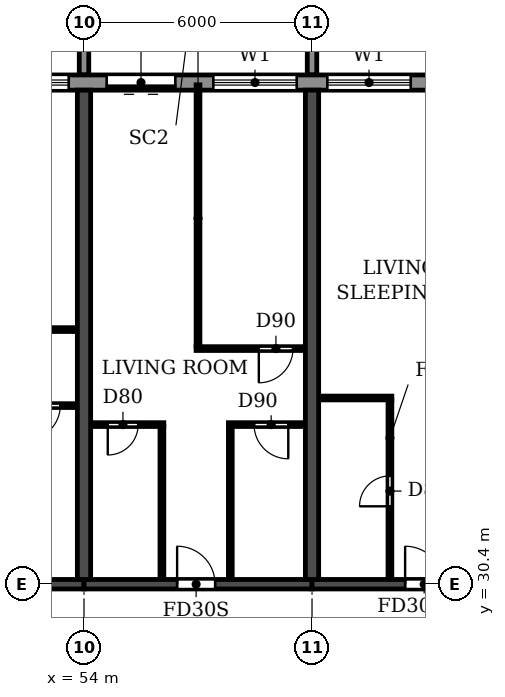
"""IFC4 building model, lengths in metres.
Left out: names, types, materials, properties, quantities, classifications, styles, units other than length and angle.
Written with IfcOpenShell. Run it as: python <this file> out.ifc"""

import sys

from ifc_helpers import new_model, si_unit, direction, frame, frame_2d, origin, place, context, subcontext, project, spatial, polyline, rectangle, outline, extrude, source, transform, mapped, element, fill, save


model = new_model("IFC4")
c1 = context("Model", 3, precision=1e-05, world=origin(), true_north=direction((0.0, 1.0)))
c2 = subcontext(c1, "Body", "Model", "MODEL_VIEW")
j1 = project(units=[si_unit("LENGTHUNIT", "METRE"), si_unit("PLANEANGLEUNIT", "RADIAN")], contexts=[c1])
p1 = place(None, origin())
s1 = spatial("IfcSite", under=j1, at=p1, CompositionType="ELEMENT")
p2 = place(p1, origin())
s2 = spatial("IfcBuilding", under=s1, at=p2, CompositionType="ELEMENT")
p3 = place(p2, frame((0.0, 0.0, 109.2)))
s3 = spatial("IfcBuildingStorey", under=s2, at=p3, CompositionType="ELEMENT", Elevation=109.2)
for number, where, z_axis, x_axis in (
    (1, (54.0, 30.525, 0.0), (0.0, 0.0, 1.0), (0.0, 1.0, 0.0)),
    (2, (60.0, 30.525, 0.0), (0.0, 0.0, 1.0), (0.0, 1.0, 0.0)),
):
    element("IfcWall", number, at=place(p3, frame(where, z_axis=z_axis, x_axis=x_axis)), inside=s3, PredefinedType="SHEAR", context=c2, shape_type="SweptSolid", body=[
        extrude(rectangle(XDim=12.875, YDim=0.35, at=frame_2d((6.438, 0.0))), origin(), (0.0, 0.0, 1.0), 3.06),
    ])
p4 = place(p3, frame((48.0, 30.4, 0.0), z_axis=(0.0, 0.0, 1.0), x_axis=(1.0, 0.0, 0.0)))
e3 = element("IfcWall", 3, at=p4, inside=s3, PredefinedType="SHEAR", context=c2, shape_type="SweptSolid", body=[
    extrude(rectangle(XDim=6.0, YDim=0.25, at=frame_2d((3.0, 0.0))), origin(), (0.0, 0.0, 1.0), 2.46),
])
p5 = place(p4, frame((2.45, 0.0, 0.0)))
e4 = element("IfcOpeningElement", 4, at=p5, cuts=e3, PredefinedType="OPENING", context=c2, shape_type="SweptSolid", body=[
    extrude(rectangle(XDim=1.0, YDim=2.1, at=frame_2d((0.5, 1.05))), frame((0.0, 0.135, 0.0), z_axis=(0.0, -1.0, 0.0), x_axis=(1.0, 0.0, 0.0)), (0.0, 0.0, 1.0), 0.27),
])
p6 = place(p3, frame((54.0, 30.4, 0.0), z_axis=(0.0, 0.0, 1.0), x_axis=(1.0, 0.0, 0.0)))
e5 = element("IfcWall", 5, at=p6, inside=s3, PredefinedType="SHEAR", context=c2, shape_type="SweptSolid", body=[
    extrude(rectangle(XDim=6.0, YDim=0.25, at=frame_2d((3.0, 0.0))), origin(), (0.0, 0.0, 1.0), 2.46),
])
p7 = place(p6, frame((2.45, 0.0, 0.0)))
e6 = element("IfcOpeningElement", 6, at=p7, cuts=e5, PredefinedType="OPENING", context=c2, shape_type="SweptSolid", body=[
    extrude(rectangle(XDim=1.0, YDim=2.1, at=frame_2d((0.5, 1.05))), frame((0.0, 0.135, 0.0), z_axis=(0.0, -1.0, 0.0), x_axis=(1.0, 0.0, 0.0)), (0.0, 0.0, 1.0), 0.27),
])
p8 = place(p3, frame((60.0, 30.4, 0.0), z_axis=(0.0, 0.0, 1.0), x_axis=(1.0, 0.0, 0.0)))
e7 = element("IfcWall", 7, at=p8, inside=s3, PredefinedType="SHEAR", context=c2, shape_type="SweptSolid", body=[
    extrude(rectangle(XDim=6.0, YDim=0.25, at=frame_2d((3.0, 0.0))), origin(), (0.0, 0.0, 1.0), 2.46),
])
p9 = place(p8, frame((2.45, 0.0, 0.0)))
e8 = element("IfcOpeningElement", 8, at=p9, cuts=e7, PredefinedType="OPENING", context=c2, shape_type="SweptSolid", body=[
    extrude(rectangle(XDim=1.0, YDim=2.1, at=frame_2d((0.5, 1.05))), frame((0.0, 0.135, 0.0), z_axis=(0.0, -1.0, 0.0), x_axis=(1.0, 0.0, 0.0)), (0.0, 0.0, 1.0), 0.27),
])
p10 = place(p3, frame((85.317, 43.6, 0.0), z_axis=(0.0, 0.0, 1.0), x_axis=(-1.0, 0.0, 0.0)))
e9 = element("IfcWall", 9, at=p10, inside=s3, PredefinedType="STANDARD", context=c2, shape_type="SweptSolid", body=[
    extrude(rectangle(XDim=68.634, YDim=0.4, at=frame_2d((34.317, 0.0))), origin(), (0.0, 0.0, 1.0), 3.06),
])
p11 = place(p10, frame((64.917, 0.0, 0.0)))
e10 = element("IfcOpeningElement", 10, at=p11, cuts=e9, PredefinedType="OPENING", context=c2, shape_type="SweptSolid", body=[
    extrude(rectangle(XDim=1.8, YDim=2.4, at=frame_2d((0.9, 1.2))), frame((0.0, 0.21, 0.0), z_axis=(0.0, -1.0, 0.0), x_axis=(1.0, 0.0, 0.0)), (0.0, 0.0, 1.0), 0.42),
])
p12 = place(p10, frame((61.717, 0.0, 0.9)))
e11 = element("IfcOpeningElement", 11, at=p12, cuts=e9, PredefinedType="OPENING", context=c2, shape_type="SweptSolid", body=[
    extrude(rectangle(XDim=2.2, YDim=1.5, at=frame_2d((1.1, 0.75))), frame((0.0, 0.21, 0.0), z_axis=(0.0, -1.0, 0.0), x_axis=(1.0, 0.0, 0.0)), (0.0, 0.0, 1.0), 0.42),
])
p13 = place(p10, frame((58.717, 0.0, 0.9)))
e12 = element("IfcOpeningElement", 12, at=p13, cuts=e9, PredefinedType="OPENING", context=c2, shape_type="SweptSolid", body=[
    extrude(rectangle(XDim=2.2, YDim=1.5, at=frame_2d((1.1, 0.75))), frame((0.0, 0.21, 0.0), z_axis=(0.0, -1.0, 0.0), x_axis=(1.0, 0.0, 0.0)), (0.0, 0.0, 1.0), 0.42),
])
p14 = place(p10, frame((55.917, 0.0, 0.0)))
e13 = element("IfcOpeningElement", 13, at=p14, cuts=e9, PredefinedType="OPENING", context=c2, shape_type="SweptSolid", body=[
    extrude(rectangle(XDim=1.8, YDim=2.4, at=frame_2d((0.9, 1.2))), frame((0.0, 0.21, 0.0), z_axis=(0.0, -1.0, 0.0), x_axis=(1.0, 0.0, 0.0)), (0.0, 0.0, 1.0), 0.42),
])
p15 = place(p10, frame((52.917, 0.0, 0.0)))
e14 = element("IfcOpeningElement", 14, at=p15, cuts=e9, PredefinedType="OPENING", context=c2, shape_type="SweptSolid", body=[
    extrude(rectangle(XDim=1.8, YDim=2.4, at=frame_2d((0.9, 1.2))), frame((0.0, 0.21, 0.0), z_axis=(0.0, -1.0, 0.0), x_axis=(1.0, 0.0, 0.0)), (0.0, 0.0, 1.0), 0.42),
])
p16 = place(p10, frame((49.717, 0.0, 0.9)))
e15 = element("IfcOpeningElement", 15, at=p16, cuts=e9, PredefinedType="OPENING", context=c2, shape_type="SweptSolid", body=[
    extrude(rectangle(XDim=2.2, YDim=1.5, at=frame_2d((1.1, 0.75))), frame((0.0, 0.21, 0.0), z_axis=(0.0, -1.0, 0.0), x_axis=(1.0, 0.0, 0.0)), (0.0, 0.0, 1.0), 0.42),
])
p17 = place(p10, frame((46.717, 0.0, 0.9)))
e16 = element("IfcOpeningElement", 16, at=p17, cuts=e9, PredefinedType="OPENING", context=c2, shape_type="SweptSolid", body=[
    extrude(rectangle(XDim=2.2, YDim=1.5, at=frame_2d((1.1, 0.75))), frame((0.0, 0.21, 0.0), z_axis=(0.0, -1.0, 0.0), x_axis=(1.0, 0.0, 0.0)), (0.0, 0.0, 1.0), 0.42),
])
p18 = place(p10, frame((43.917, 0.0, 0.0)))
e17 = element("IfcOpeningElement", 17, at=p18, cuts=e9, PredefinedType="OPENING", context=c2, shape_type="SweptSolid", body=[
    extrude(rectangle(XDim=1.8, YDim=2.4, at=frame_2d((0.9, 1.2))), frame((0.0, 0.21, 0.0), z_axis=(0.0, -1.0, 0.0), x_axis=(1.0, 0.0, 0.0)), (0.0, 0.0, 1.0), 0.42),
])
p19 = place(p10, frame((40.717, 0.0, 0.9)))
e18 = element("IfcOpeningElement", 18, at=p19, cuts=e9, PredefinedType="OPENING", context=c2, shape_type="SweptSolid", body=[
    extrude(rectangle(XDim=2.2, YDim=1.5, at=frame_2d((1.1, 0.75))), frame((0.0, 0.21, 0.0), z_axis=(0.0, -1.0, 0.0), x_axis=(1.0, 0.0, 0.0)), (0.0, 0.0, 1.0), 0.42),
])
p20 = place(p10, frame((37.717, 0.0, 0.9)))
e19 = element("IfcOpeningElement", 19, at=p20, cuts=e9, PredefinedType="OPENING", context=c2, shape_type="SweptSolid", body=[
    extrude(rectangle(XDim=2.2, YDim=1.5, at=frame_2d((1.1, 0.75))), frame((0.0, 0.21, 0.0), z_axis=(0.0, -1.0, 0.0), x_axis=(1.0, 0.0, 0.0)), (0.0, 0.0, 1.0), 0.42),
])
p21 = place(p10, frame((34.917, 0.0, 0.0)))
e20 = element("IfcOpeningElement", 20, at=p21, cuts=e9, PredefinedType="OPENING", context=c2, shape_type="SweptSolid", body=[
    extrude(rectangle(XDim=1.8, YDim=2.4, at=frame_2d((0.9, 1.2))), frame((0.0, 0.21, 0.0), z_axis=(0.0, -1.0, 0.0), x_axis=(1.0, 0.0, 0.0)), (0.0, 0.0, 1.0), 0.42),
])
p22 = place(p10, frame((31.717, 0.0, 0.9)))
e21 = element("IfcOpeningElement", 21, at=p22, cuts=e9, PredefinedType="OPENING", context=c2, shape_type="SweptSolid", body=[
    extrude(rectangle(XDim=2.2, YDim=1.5, at=frame_2d((1.1, 0.75))), frame((0.0, 0.21, 0.0), z_axis=(0.0, -1.0, 0.0), x_axis=(1.0, 0.0, 0.0)), (0.0, 0.0, 1.0), 0.42),
])
p23 = place(p10, frame((28.917, 0.0, 0.0)))
e22 = element("IfcOpeningElement", 22, at=p23, cuts=e9, PredefinedType="OPENING", context=c2, shape_type="SweptSolid", body=[
    extrude(rectangle(XDim=1.8, YDim=2.4, at=frame_2d((0.9, 1.2))), frame((0.0, 0.21, 0.0), z_axis=(0.0, -1.0, 0.0), x_axis=(1.0, 0.0, 0.0)), (0.0, 0.0, 1.0), 0.42),
])
p24 = place(p10, frame((25.717, 0.0, 0.9)))
e23 = element("IfcOpeningElement", 23, at=p24, cuts=e9, PredefinedType="OPENING", context=c2, shape_type="SweptSolid", body=[
    extrude(rectangle(XDim=2.2, YDim=1.5, at=frame_2d((1.1, 0.75))), frame((0.0, 0.21, 0.0), z_axis=(0.0, -1.0, 0.0), x_axis=(1.0, 0.0, 0.0)), (0.0, 0.0, 1.0), 0.42),
])
p25 = place(p10, frame((22.717, 0.0, 0.9)))
e24 = element("IfcOpeningElement", 24, at=p25, cuts=e9, PredefinedType="OPENING", context=c2, shape_type="SweptSolid", body=[
    extrude(rectangle(XDim=2.2, YDim=1.5, at=frame_2d((1.1, 0.75))), frame((0.0, 0.21, 0.0), z_axis=(0.0, -1.0, 0.0), x_axis=(1.0, 0.0, 0.0)), (0.0, 0.0, 1.0), 0.42),
])
p26 = place(p10, frame((19.917, 0.0, 0.0)))
e25 = element("IfcOpeningElement", 25, at=p26, cuts=e9, PredefinedType="OPENING", context=c2, shape_type="SweptSolid", body=[
    extrude(rectangle(XDim=1.8, YDim=2.4, at=frame_2d((0.9, 1.2))), frame((0.0, 0.21, 0.0), z_axis=(0.0, -1.0, 0.0), x_axis=(1.0, 0.0, 0.0)), (0.0, 0.0, 1.0), 0.42),
])
p27 = place(p10, frame((16.717, 0.0, 0.9)))
e26 = element("IfcOpeningElement", 26, at=p27, cuts=e9, PredefinedType="OPENING", context=c2, shape_type="SweptSolid", body=[
    extrude(rectangle(XDim=2.2, YDim=1.5, at=frame_2d((1.1, 0.75))), frame((0.0, 0.21, 0.0), z_axis=(0.0, -1.0, 0.0), x_axis=(1.0, 0.0, 0.0)), (0.0, 0.0, 1.0), 0.42),
])
p28 = place(p10, frame((13.917, 0.0, 0.0)))
e27 = element("IfcOpeningElement", 27, at=p28, cuts=e9, PredefinedType="OPENING", context=c2, shape_type="SweptSolid", body=[
    extrude(rectangle(XDim=1.8, YDim=2.4, at=frame_2d((0.9, 1.2))), frame((0.0, 0.21, 0.0), z_axis=(0.0, -1.0, 0.0), x_axis=(1.0, 0.0, 0.0)), (0.0, 0.0, 1.0), 0.42),
])
p29 = place(p10, frame((10.717, 0.0, 0.9)))
e28 = element("IfcOpeningElement", 28, at=p29, cuts=e9, PredefinedType="OPENING", context=c2, shape_type="SweptSolid", body=[
    extrude(rectangle(XDim=2.2, YDim=1.5, at=frame_2d((1.1, 0.75))), frame((0.0, 0.21, 0.0), z_axis=(0.0, -1.0, 0.0), x_axis=(1.0, 0.0, 0.0)), (0.0, 0.0, 1.0), 0.42),
])
p30 = place(p10, frame((7.717, 0.0, 0.9)))
e29 = element("IfcOpeningElement", 29, at=p30, cuts=e9, PredefinedType="OPENING", context=c2, shape_type="SweptSolid", body=[
    extrude(rectangle(XDim=2.2, YDim=1.5, at=frame_2d((1.1, 0.75))), frame((0.0, 0.21, 0.0), z_axis=(0.0, -1.0, 0.0), x_axis=(1.0, 0.0, 0.0)), (0.0, 0.0, 1.0), 0.42),
])
p31 = place(p10, frame((4.917, 0.0, 0.0)))
e30 = element("IfcOpeningElement", 30, at=p31, cuts=e9, PredefinedType="OPENING", context=c2, shape_type="SweptSolid", body=[
    extrude(rectangle(XDim=1.8, YDim=2.4, at=frame_2d((0.9, 1.2))), frame((0.0, 0.21, 0.0), z_axis=(0.0, -1.0, 0.0), x_axis=(1.0, 0.0, 0.0)), (0.0, 0.0, 1.0), 0.42),
])
p32 = place(p10, frame((1.717, 0.0, 0.9)))
e31 = element("IfcOpeningElement", 31, at=p32, cuts=e9, PredefinedType="OPENING", context=c2, shape_type="SweptSolid", body=[
    extrude(rectangle(XDim=2.2, YDim=1.5, at=frame_2d((1.1, 0.75))), frame((0.0, 0.21, 0.0), z_axis=(0.0, -1.0, 0.0), x_axis=(1.0, 0.0, 0.0)), (0.0, 0.0, 1.0), 0.42),
])
m1 = source(origin(), c2, "Body", "SweptSolid", [
    extrude(outline(polyline([(0.0, 0.0), (0.25, 0.0), (0.25, 3.1), (0.0, 3.1), (0.0, 0.0)])), origin(), (0.0, 0.0, 1.0), 3.1),
])
for number, where in (
    (32, (53.875, 43.8, 0.0)),
    (33, (59.875, 43.8, 0.0)),
):
    element("IfcWall", number, at=place(p3, frame(where)), inside=s3, PredefinedType="STANDARD", context=c2, shape_type="MappedRepresentation", body=[
        mapped(m1, transform((0.0, 0.0, 0.0))),
    ])
p33 = place(p3, frame((54.185, 34.6, 0.0), z_axis=(0.0, 0.0, 1.0), x_axis=(1.0, 0.0, 0.0)))
e34 = element("IfcWall", 34, at=p33, inside=s3, PredefinedType="PARTITIONING", context=c2, shape_type="SweptSolid", body=[
    extrude(rectangle(XDim=1.915, YDim=0.1, at=frame_2d((0.958, 0.0))), origin(), (0.0, 0.0, 1.0), 3.06),
])
p34 = place(p33, frame((0.44, 0.0, 0.0)))
e35 = element("IfcOpeningElement", 35, at=p34, cuts=e34, PredefinedType="OPENING", context=c2, shape_type="SweptSolid", body=[
    extrude(rectangle(XDim=0.8, YDim=2.1, at=frame_2d((0.4, 1.05))), frame((0.0, 0.06, 0.0), z_axis=(0.0, -1.0, 0.0), x_axis=(1.0, 0.0, 0.0)), (0.0, 0.0, 1.0), 0.12),
])
p35 = place(p3, frame((57.8, 34.6, 0.0), z_axis=(0.0, 0.0, 1.0), x_axis=(1.0, 0.0, 0.0)))
e36 = element("IfcWall", 36, at=p35, inside=s3, PredefinedType="PARTITIONING", context=c2, shape_type="SweptSolid", body=[
    extrude(rectangle(XDim=2.015, YDim=0.1, at=frame_2d((1.007, 0.0))), origin(), (0.0, 0.0, 1.0), 3.06),
])
p36 = place(p35, frame((0.675, 0.0, 0.0)))
e37 = element("IfcOpeningElement", 37, at=p36, cuts=e36, PredefinedType="OPENING", context=c2, shape_type="SweptSolid", body=[
    extrude(rectangle(XDim=0.9, YDim=2.1, at=frame_2d((0.45, 1.05))), frame((0.0, 0.06, 0.0), z_axis=(0.0, -1.0, 0.0), x_axis=(1.0, 0.0, 0.0)), (0.0, 0.0, 1.0), 0.12),
])
p37 = place(p3, frame((51.8, 35.1, 0.0), z_axis=(0.0, 0.0, 1.0), x_axis=(1.0, 0.0, 0.0)))
e38 = element("IfcWall", 38, at=p37, inside=s3, PredefinedType="PARTITIONING", context=c2, shape_type="SweptSolid", body=[
    extrude(rectangle(XDim=2.015, YDim=0.1, at=frame_2d((1.007, 0.0))), origin(), (0.0, 0.0, 1.0), 3.06),
])
p38 = place(p37, frame((0.675, 0.0, 0.0)))
e39 = element("IfcOpeningElement", 39, at=p38, cuts=e38, PredefinedType="OPENING", context=c2, shape_type="SweptSolid", body=[
    extrude(rectangle(XDim=0.9, YDim=2.1, at=frame_2d((0.45, 1.05))), frame((0.0, 0.06, 0.0), z_axis=(0.0, -1.0, 0.0), x_axis=(1.0, 0.0, 0.0)), (0.0, 0.0, 1.0), 0.12),
])
p39 = place(p3, frame((60.185, 35.3, 0.0), z_axis=(0.0, 0.0, 1.0), x_axis=(1.0, 0.0, 0.0)))
e40 = element("IfcWall", 40, at=p39, inside=s3, PredefinedType="PARTITIONING", context=c2, shape_type="SweptSolid", body=[
    extrude(rectangle(XDim=1.915, YDim=0.1, at=frame_2d((0.958, 0.0))), origin(), (0.0, 0.0, 1.0), 3.06),
])
p40 = place(p3, frame((56.95, 36.6, 0.0), z_axis=(0.0, 0.0, 1.0), x_axis=(1.0, 0.0, 0.0)))
e41 = element("IfcWall", 41, at=p40, inside=s3, PredefinedType="PARTITIONING", context=c2, shape_type="SweptSolid", body=[
    extrude(rectangle(XDim=2.865, YDim=0.1, at=frame_2d((1.433, 0.0))), origin(), (0.0, 0.0, 1.0), 3.06),
])
p41 = place(p40, frame((1.65, 0.0, 0.0)))
e42 = element("IfcOpeningElement", 42, at=p41, cuts=e41, PredefinedType="OPENING", context=c2, shape_type="SweptSolid", body=[
    extrude(rectangle(XDim=0.9, YDim=2.1, at=frame_2d((0.45, 1.05))), frame((0.0, 0.06, 0.0), z_axis=(0.0, -1.0, 0.0), x_axis=(1.0, 0.0, 0.0)), (0.0, 0.0, 1.0), 0.12),
])
p42 = place(p3, frame((50.95, 37.1, 0.0), z_axis=(0.0, 0.0, 1.0), x_axis=(1.0, 0.0, 0.0)))
e43 = element("IfcWall", 43, at=p42, inside=s3, PredefinedType="PARTITIONING", context=c2, shape_type="SweptSolid", body=[
    extrude(rectangle(XDim=2.865, YDim=0.1, at=frame_2d((1.433, 0.0))), origin(), (0.0, 0.0, 1.0), 3.06),
])
p43 = place(p42, frame((0.55, 0.0, 0.0)))
e44 = element("IfcOpeningElement", 44, at=p43, cuts=e43, PredefinedType="OPENING", context=c2, shape_type="SweptSolid", body=[
    extrude(rectangle(XDim=0.9, YDim=2.1, at=frame_2d((0.45, 1.05))), frame((0.0, 0.06, 0.0), z_axis=(0.0, -1.0, 0.0), x_axis=(1.0, 0.0, 0.0)), (0.0, 0.0, 1.0), 0.12),
])
p44 = place(p3, frame((56.05, 30.535, 0.0), z_axis=(0.0, 0.0, 1.0), x_axis=(0.0, 1.0, 0.0)))
e45 = element("IfcWall", 45, at=p44, inside=s3, PredefinedType="PARTITIONING", context=c2, shape_type="SweptSolid", body=[
    extrude(rectangle(XDim=4.015, YDim=0.1, at=frame_2d((2.008, 0.0))), origin(), (0.0, 0.0, 1.0), 3.06),
])
p45 = place(p3, frame((57.0, 36.65, 0.0), z_axis=(0.0, 0.0, 1.0), x_axis=(0.0, 1.0, 0.0)))
e46 = element("IfcWall", 46, at=p45, inside=s3, PredefinedType="PARTITIONING", context=c2, shape_type="SweptSolid", body=[
    extrude(rectangle(XDim=6.89, YDim=0.1, at=frame_2d((3.445, 0.0))), origin(), (0.0, 0.0, 1.0), 3.06),
])
p46 = place(p3, frame((57.85, 30.535, 0.0), z_axis=(0.0, 0.0, 1.0), x_axis=(0.0, 1.0, 0.0)))
e47 = element("IfcWall", 47, at=p46, inside=s3, PredefinedType="PARTITIONING", context=c2, shape_type="SweptSolid", body=[
    extrude(rectangle(XDim=4.015, YDim=0.1, at=frame_2d((2.008, 0.0))), origin(), (0.0, 0.0, 1.0), 3.06),
])
p47 = place(p3, frame((62.05, 30.535, 0.0), z_axis=(0.0, 0.0, 1.0), x_axis=(0.0, 1.0, 0.0)))
e48 = element("IfcWall", 48, at=p47, inside=s3, PredefinedType="PARTITIONING", context=c2, shape_type="SweptSolid", body=[
    extrude(rectangle(XDim=4.715, YDim=0.1, at=frame_2d((2.357, 0.0))), origin(), (0.0, 0.0, 1.0), 3.06),
])
p48 = place(p47, frame((1.915, 0.0, 0.0)))
e49 = element("IfcOpeningElement", 49, at=p48, cuts=e48, PredefinedType="OPENING", context=c2, shape_type="SweptSolid", body=[
    extrude(rectangle(XDim=0.8, YDim=2.1, at=frame_2d((0.4, 1.05))), frame((0.0, 0.06, 0.0), z_axis=(0.0, -1.0, 0.0), x_axis=(1.0, 0.0, 0.0)), (0.0, 0.0, 1.0), 0.12),
])
p49 = place(p22, origin())
e50 = element("IfcWindow", 50, at=p49, inside=s3, PartitioningType="DOUBLE_PANEL_HORIZONTAL", PredefinedType="WINDOW", context=c2, shape_type="SweptSolid", body=[
    extrude(rectangle(XDim=2.2, YDim=1.5, at=frame_2d((1.1, 0.75))), frame((0.0, 0.03, 0.0), z_axis=(0.0, -1.0, 0.0), x_axis=(1.0, 0.0, 0.0)), (0.0, 0.0, 1.0), 0.06),
])
fill(e21, e50)
p50 = place(p23, origin())
e51 = element("IfcDoor", 51, at=p50, inside=s3, OperationType="DOUBLE_DOOR_SLIDING", PredefinedType="DOOR", context=c2, shape_type="SweptSolid", body=[
    extrude(rectangle(XDim=1.8, YDim=2.4, at=frame_2d((0.9, 1.2))), frame((0.0, 0.025, 0.0), z_axis=(0.0, -1.0, 0.0), x_axis=(1.0, 0.0, 0.0)), (0.0, 0.0, 1.0), 0.05),
])
fill(e22, e51)
p51 = place(p24, origin())
e52 = element("IfcWindow", 52, at=p51, inside=s3, PartitioningType="DOUBLE_PANEL_HORIZONTAL", PredefinedType="WINDOW", context=c2, shape_type="SweptSolid", body=[
    extrude(rectangle(XDim=2.2, YDim=1.5, at=frame_2d((1.1, 0.75))), frame((0.0, 0.03, 0.0), z_axis=(0.0, -1.0, 0.0), x_axis=(1.0, 0.0, 0.0)), (0.0, 0.0, 1.0), 0.06),
])
fill(e23, e52)
p52 = place(p25, origin())
e53 = element("IfcWindow", 53, at=p52, inside=s3, PartitioningType="DOUBLE_PANEL_HORIZONTAL", PredefinedType="WINDOW", context=c2, shape_type="SweptSolid", body=[
    extrude(rectangle(XDim=2.2, YDim=1.5, at=frame_2d((1.1, 0.75))), frame((0.0, 0.03, 0.0), z_axis=(0.0, -1.0, 0.0), x_axis=(1.0, 0.0, 0.0)), (0.0, 0.0, 1.0), 0.06),
])
fill(e24, e53)
p53 = place(p38, frame((0.9, 0.0, 0.0), z_axis=(0.0, 0.0, 1.0), x_axis=(-1.0, 0.0, 0.0)))
e54 = element("IfcDoor", 54, at=p53, inside=s3, OperationType="SINGLE_SWING_RIGHT", PredefinedType="DOOR", context=c2, shape_type="SweptSolid", body=[
    extrude(rectangle(XDim=0.9, YDim=2.1, at=frame_2d((0.45, 1.05))), frame((0.0, 0.025, 0.0), z_axis=(0.0, -1.0, 0.0), x_axis=(1.0, 0.0, 0.0)), (0.0, 0.0, 1.0), 0.05),
])
fill(e39, e54)
p54 = place(p34, frame((0.8, 0.0, 0.0), z_axis=(0.0, 0.0, 1.0), x_axis=(-1.0, 0.0, 0.0)))
e55 = element("IfcDoor", 55, at=p54, inside=s3, OperationType="SINGLE_SWING_RIGHT", PredefinedType="DOOR", context=c2, shape_type="SweptSolid", body=[
    extrude(rectangle(XDim=0.8, YDim=2.1, at=frame_2d((0.4, 1.05))), frame((0.0, 0.025, 0.0), z_axis=(0.0, -1.0, 0.0), x_axis=(1.0, 0.0, 0.0)), (0.0, 0.0, 1.0), 0.05),
])
fill(e35, e55)
p55 = place(p7, origin())
e56 = element("IfcDoor", 56, at=p55, inside=s3, OperationType="SINGLE_SWING_LEFT", PredefinedType="DOOR", context=c2, shape_type="SweptSolid", body=[
    extrude(rectangle(XDim=1.0, YDim=2.1, at=frame_2d((0.5, 1.05))), frame((0.0, 0.025, 0.0), z_axis=(0.0, -1.0, 0.0), x_axis=(1.0, 0.0, 0.0)), (0.0, 0.0, 1.0), 0.05),
])
fill(e6, e56)
p56 = place(p36, frame((0.9, 0.0, 0.0), z_axis=(0.0, 0.0, 1.0), x_axis=(-1.0, 0.0, 0.0)))
e57 = element("IfcDoor", 57, at=p56, inside=s3, OperationType="SINGLE_SWING_LEFT", PredefinedType="DOOR", context=c2, shape_type="SweptSolid", body=[
    extrude(rectangle(XDim=0.9, YDim=2.1, at=frame_2d((0.45, 1.05))), frame((0.0, 0.025, 0.0), z_axis=(0.0, -1.0, 0.0), x_axis=(1.0, 0.0, 0.0)), (0.0, 0.0, 1.0), 0.05),
])
fill(e37, e57)
p57 = place(p41, frame((0.9, 0.0, 0.0), z_axis=(0.0, 0.0, 1.0), x_axis=(-1.0, 0.0, 0.0)))
e58 = element("IfcDoor", 58, at=p57, inside=s3, OperationType="SINGLE_SWING_RIGHT", PredefinedType="DOOR", context=c2, shape_type="SweptSolid", body=[
    extrude(rectangle(XDim=0.9, YDim=2.1, at=frame_2d((0.45, 1.05))), frame((0.0, 0.025, 0.0), z_axis=(0.0, -1.0, 0.0), x_axis=(1.0, 0.0, 0.0)), (0.0, 0.0, 1.0), 0.05),
])
fill(e42, e58)
p58 = place(p48, origin())
e59 = element("IfcDoor", 59, at=p58, inside=s3, OperationType="SINGLE_SWING_LEFT", PredefinedType="DOOR", context=c2, shape_type="SweptSolid", body=[
    extrude(rectangle(XDim=0.8, YDim=2.1, at=frame_2d((0.4, 1.05))), frame((0.0, 0.025, 0.0), z_axis=(0.0, -1.0, 0.0), x_axis=(1.0, 0.0, 0.0)), (0.0, 0.0, 1.0), 0.05),
])
fill(e49, e59)
p59 = place(p9, origin())
e60 = element("IfcDoor", 60, at=p59, inside=s3, OperationType="SINGLE_SWING_LEFT", PredefinedType="DOOR", context=c2, shape_type="SweptSolid", body=[
    extrude(rectangle(XDim=1.0, YDim=2.1, at=frame_2d((0.5, 1.05))), frame((0.0, 0.025, 0.0), z_axis=(0.0, -1.0, 0.0), x_axis=(1.0, 0.0, 0.0)), (0.0, 0.0, 1.0), 0.05),
])
fill(e8, e60)
save(model, sys.argv[1])
